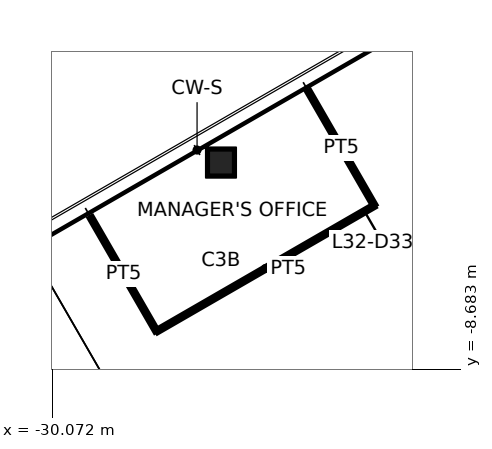
"""IFC4 building model, lengths in metres.
Left out: names, types, materials, properties, quantities, classifications, styles, units other than length and angle.
Written with IfcOpenShell. Run it as: python <this file> out.ifc"""

import sys

from ifc_helpers import new_model, si_unit, direction, frame, frame_2d, origin, origin_2d, place, context, subcontext, project, spatial, rectangle, hollow_rectangle, extrude, element, fill, save


model = new_model("IFC4")
c1 = context("Model", 3, precision=1e-05, world=origin(), true_north=direction((0.0, 1.0)))
c2 = subcontext(c1, "Body", "Model", "MODEL_VIEW")
j1 = project(units=[si_unit("LENGTHUNIT", "METRE"), si_unit("PLANEANGLEUNIT", "RADIAN")], contexts=[c1])
p1 = place(None, origin())
s1 = spatial("IfcSite", under=j1, at=p1, CompositionType="ELEMENT")
p2 = place(p1, origin())
s2 = spatial("IfcBuilding", under=s1, at=p2, CompositionType="ELEMENT")
p3 = place(p2, frame((0.0, 0.0, 128.6)))
s3 = spatial("IfcBuildingStorey", under=s2, at=p3, CompositionType="ELEMENT", Elevation=128.6)
p4 = place(p3, frame((-25.629, -3.25, 0.0), z_axis=(0.0, 0.0, 1.0), x_axis=(1.0, 0.0, 0.0)))
e1 = element("IfcColumn", 1, at=p4, inside=s3, PredefinedType="COLUMN", context=c2, shape_type="SweptSolid", body=[
    extrude(hollow_rectangle(XDim=0.7, YDim=0.7, WallThickness=0.036, at=origin_2d()), origin(), (0.0, 0.0, 1.0), 4.5),
])
p5 = place(p3, frame((-27.325, -7.693, 0.0), z_axis=(0.0, 0.0, 1.0), x_axis=(-0.500020871164, 0.866013353477, 0.0)))
e2 = element("IfcWall", 2, at=p5, inside=s3, PredefinedType="PARTITIONING", context=c2, shape_type="SweptSolid", body=[
    extrude(rectangle(XDim=3.47, YDim=0.1, at=frame_2d((1.735, 0.0))), origin(), (0.0, 0.0, 1.0), 3.55),
])
p6 = place(p3, frame((-23.332, -1.37, 0.0), z_axis=(0.0, 0.0, 1.0), x_axis=(0.500009906705, -0.86601968407, 0.0)))
e3 = element("IfcWall", 3, at=p6, inside=s3, PredefinedType="PARTITIONING", context=c2, shape_type="SweptSolid", body=[
    extrude(rectangle(XDim=3.48, YDim=0.1, at=frame_2d((1.74, 0.0))), origin(), (0.0, 0.0, 1.0), 3.55),
])
p7 = place(p3, frame((-21.592, -4.383, 0.0), z_axis=(0.0, 0.0, 1.0), x_axis=(-0.866021597574, -0.500006592492, 0.0)))
e4 = element("IfcWall", 4, at=p7, inside=s3, PredefinedType="PARTITIONING", context=c2, shape_type="SweptSolid", body=[
    extrude(rectangle(XDim=6.62, YDim=0.1, at=frame_2d((3.31, 0.0))), origin(), (0.0, 0.0, 1.0), 3.55),
])
p8 = place(p7, frame((0.3, 0.0, 0.0)))
e5 = element("IfcOpeningElement", 5, at=p8, cuts=e4, PredefinedType="OPENING", context=c2, shape_type="SweptSolid", body=[
    extrude(rectangle(XDim=0.9, YDim=2.1, at=frame_2d((0.45, 1.05))), frame((0.0, 0.06, 0.0), z_axis=(0.0, -1.0, 0.0), x_axis=(1.0, 0.0, 0.0)), (0.0, 0.0, 1.0), 0.12),
])
p9 = place(p8, origin())
e6 = element("IfcDoor", 6, at=p9, inside=s3, OperationType="SINGLE_SWING_LEFT", PredefinedType="DOOR", context=c2, shape_type="SweptSolid", body=[
    extrude(rectangle(XDim=0.9, YDim=2.1, at=frame_2d((0.45, 1.05))), frame((0.0, 0.025, 0.0), z_axis=(0.0, -1.0, 0.0), x_axis=(1.0, 0.0, 0.0)), (0.0, 0.0, 1.0), 0.05),
])
fill(e5, e6)
save(model, sys.argv[1])
